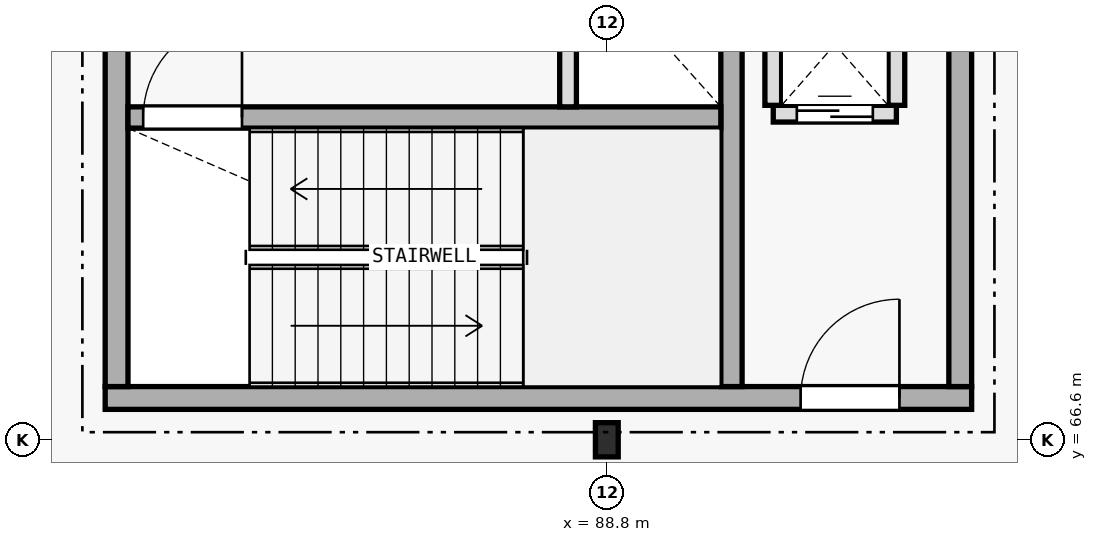
"""IFC4 building model, lengths in metres.
Left out: names, types, materials, properties, quantities, classifications, styles, units other than length and angle.
Written with IfcOpenShell. Run it as: python <this file> out.ifc"""

import sys

from ifc_helpers import new_model, si_unit, direction, frame, frame_2d, origin, origin_2d, place, context, subcontext, project, spatial, rectangle, i_section, extrude, element, fill, save


model = new_model("IFC4")
c1 = context("Model", 3, precision=1e-05, world=origin(), true_north=direction((0.0, 1.0)))
c2 = subcontext(c1, "Body", "Model", "MODEL_VIEW")
j1 = project(units=[si_unit("LENGTHUNIT", "METRE"), si_unit("PLANEANGLEUNIT", "RADIAN")], contexts=[c1])
p1 = place(None, origin())
s1 = spatial("IfcSite", under=j1, at=p1, CompositionType="ELEMENT")
p2 = place(p1, origin())
s2 = spatial("IfcBuilding", under=s1, at=p2, CompositionType="ELEMENT")
p3 = place(p2, frame((0.0, 0.0, 5.4)))
s3 = spatial("IfcBuildingStorey", under=s2, at=p3, CompositionType="ELEMENT", Elevation=5.4)
p4 = place(p3, frame((82.2, 67.15, 0.0), z_axis=(0.0, 0.0, 1.0), x_axis=(1.0, 0.0, 0.0)))
e1 = element("IfcWall", 1, at=p4, inside=s3, PredefinedType="SHEAR", context=c2, shape_type="SweptSolid", body=[
    extrude(rectangle(XDim=11.4, YDim=0.3, at=frame_2d((5.7, 0.0))), origin(), (0.0, 0.0, 1.0), 4.495),
])
p5 = place(p4, frame((9.15, 0.0, 0.0)))
e2 = element("IfcOpeningElement", 2, at=p5, cuts=e1, PredefinedType="OPENING", context=c2, shape_type="SweptSolid", body=[
    extrude(rectangle(XDim=1.3, YDim=2.2, at=frame_2d((0.65, 1.1))), frame((0.0, 0.16, 0.0), z_axis=(0.0, -1.0, 0.0), x_axis=(1.0, 0.0, 0.0)), (0.0, 0.0, 1.0), 0.32),
])
for number, where, z_axis, x_axis in (
    (3, (82.35, 67.3, 0.0), (0.0, 0.0, 1.0), (0.0, 1.0, 0.0)),
    (4, (93.45, 67.3, 0.0), (0.0, 0.0, 1.0), (0.0, 1.0, 0.0)),
):
    element("IfcWall", number, at=place(p3, frame(where, z_axis=z_axis, x_axis=x_axis)), inside=s3, PredefinedType="SHEAR", context=c2, shape_type="SweptSolid", body=[
        extrude(rectangle(XDim=5.8, YDim=0.3, at=frame_2d((2.9, 0.0))), origin(), (0.0, 0.0, 1.0), 4.495),
    ])
p6 = place(p3, frame((90.44, 67.3, 0.0), z_axis=(0.0, 0.0, 1.0), x_axis=(0.0, 1.0, 0.0)))
e5 = element("IfcWall", 5, at=p6, inside=s3, PredefinedType="SHEAR", context=c2, shape_type="SweptSolid", body=[
    extrude(rectangle(XDim=5.8, YDim=0.28, at=frame_2d((2.9, 0.0))), origin(), (0.0, 0.0, 1.0), 4.495),
])
p7 = place(p3, frame((82.5, 70.84, 0.0), z_axis=(0.0, 0.0, 1.0), x_axis=(1.0, 0.0, 0.0)))
e6 = element("IfcWall", 6, at=p7, inside=s3, PredefinedType="SHEAR", context=c2, shape_type="SweptSolid", body=[
    extrude(rectangle(XDim=7.8, YDim=0.28, at=frame_2d((3.9, 0.0))), origin(), (0.0, 0.0, 1.0), 4.495),
])
p8 = place(p7, frame((0.2, 0.0, 0.0)))
e7 = element("IfcOpeningElement", 7, at=p8, cuts=e6, PredefinedType="OPENING", context=c2, shape_type="SweptSolid", body=[
    extrude(rectangle(XDim=1.3, YDim=2.2, at=frame_2d((0.65, 1.1))), frame((0.0, 0.15, 0.0), z_axis=(0.0, -1.0, 0.0), x_axis=(1.0, 0.0, 0.0)), (0.0, 0.0, 1.0), 0.3),
])
p9 = place(p3, frame((88.8, 66.6, 0.0), z_axis=(0.0, 0.0, 1.0), x_axis=(1.0, 0.0, 0.0)))
e8 = element("IfcColumn", 8, at=p9, inside=s3, PredefinedType="COLUMN", context=c2, shape_type="SweptSolid", body=[
    extrude(i_section(OverallWidth=0.3, OverallDepth=0.45, WebThickness=0.014, FlangeThickness=0.026, FilletRadius=0.027, at=origin_2d()), origin(), (0.0, 0.0, 1.0), 4.5),
])
p10 = place(p3, frame((90.99, 70.89, 0.0), z_axis=(0.0, 0.0, 1.0), x_axis=(1.0, 0.0, 0.0)))
e9 = element("IfcWall", 9, at=p10, inside=s3, PredefinedType="PLUMBINGWALL", context=c2, shape_type="SweptSolid", body=[
    extrude(rectangle(XDim=1.62, YDim=0.22, at=frame_2d((0.81, 0.0))), origin(), (0.0, 0.0, 1.0), 4.2),
])
p11 = place(p10, frame((0.31, 0.0, 0.0)))
e10 = element("IfcOpeningElement", 10, at=p11, cuts=e9, PredefinedType="OPENING", context=c2, shape_type="SweptSolid", body=[
    extrude(rectangle(XDim=1.0, YDim=2.2, at=frame_2d((0.5, 1.1))), frame((0.0, 0.12, 0.0), z_axis=(0.0, -1.0, 0.0), x_axis=(1.0, 0.0, 0.0)), (0.0, 0.0, 1.0), 0.24),
])
for number, where, z_axis, x_axis in (
    (11, (90.99, 71.0, 0.0), (0.0, 0.0, 1.0), (0.0, 1.0, 0.0)),
    (12, (92.61, 71.0, 0.0), (0.0, 0.0, 1.0), (0.0, 1.0, 0.0)),
):
    element("IfcWall", number, at=place(p3, frame(where, z_axis=z_axis, x_axis=x_axis)), inside=s3, PredefinedType="PLUMBINGWALL", context=c2, shape_type="SweptSolid", body=[
        extrude(rectangle(XDim=1.6, YDim=0.22, at=frame_2d((0.8, 0.0))), origin(), (0.0, 0.0, 1.0), 4.2),
    ])
p12 = place(p3, frame((88.29, 70.98, 0.0), z_axis=(0.0, 0.0, 1.0), x_axis=(0.0, 1.0, 0.0)))
e13 = element("IfcWall", 13, at=p12, inside=s3, PredefinedType="PLUMBINGWALL", context=c2, shape_type="SweptSolid", body=[
    extrude(rectangle(XDim=2.12, YDim=0.22, at=frame_2d((1.06, 0.0))), origin(), (0.0, 0.0, 1.0), 4.2),
])
p13 = place(p8, origin())
e14 = element("IfcDoor", 14, at=p13, inside=s3, OperationType="SINGLE_SWING_RIGHT", PredefinedType="DOOR", context=c2, shape_type="SweptSolid", body=[
    extrude(rectangle(XDim=1.3, YDim=2.2, at=frame_2d((0.65, 1.1))), frame((0.0, 0.025, 0.0), z_axis=(0.0, -1.0, 0.0), x_axis=(1.0, 0.0, 0.0)), (0.0, 0.0, 1.0), 0.05),
])
fill(e7, e14)
p14 = place(p11, origin())
e15 = element("IfcDoor", 15, at=p14, inside=s3, OperationType="DOUBLE_DOOR_SLIDING", PredefinedType="DOOR", context=c2, shape_type="SweptSolid", body=[
    extrude(rectangle(XDim=1.0, YDim=2.2, at=frame_2d((0.5, 1.1))), frame((0.0, 0.025, 0.0), z_axis=(0.0, -1.0, 0.0), x_axis=(1.0, 0.0, 0.0)), (0.0, 0.0, 1.0), 0.05),
])
fill(e10, e15)
p15 = place(p5, origin())
e16 = element("IfcDoor", 16, at=p15, inside=s3, OperationType="SINGLE_SWING_RIGHT", PredefinedType="DOOR", context=c2, shape_type="SweptSolid", body=[
    extrude(rectangle(XDim=1.3, YDim=2.2, at=frame_2d((0.65, 1.1))), frame((0.0, 0.025, 0.0), z_axis=(0.0, -1.0, 0.0), x_axis=(1.0, 0.0, 0.0)), (0.0, 0.0, 1.0), 0.05),
])
fill(e2, e16)
save(model, sys.argv[1])
